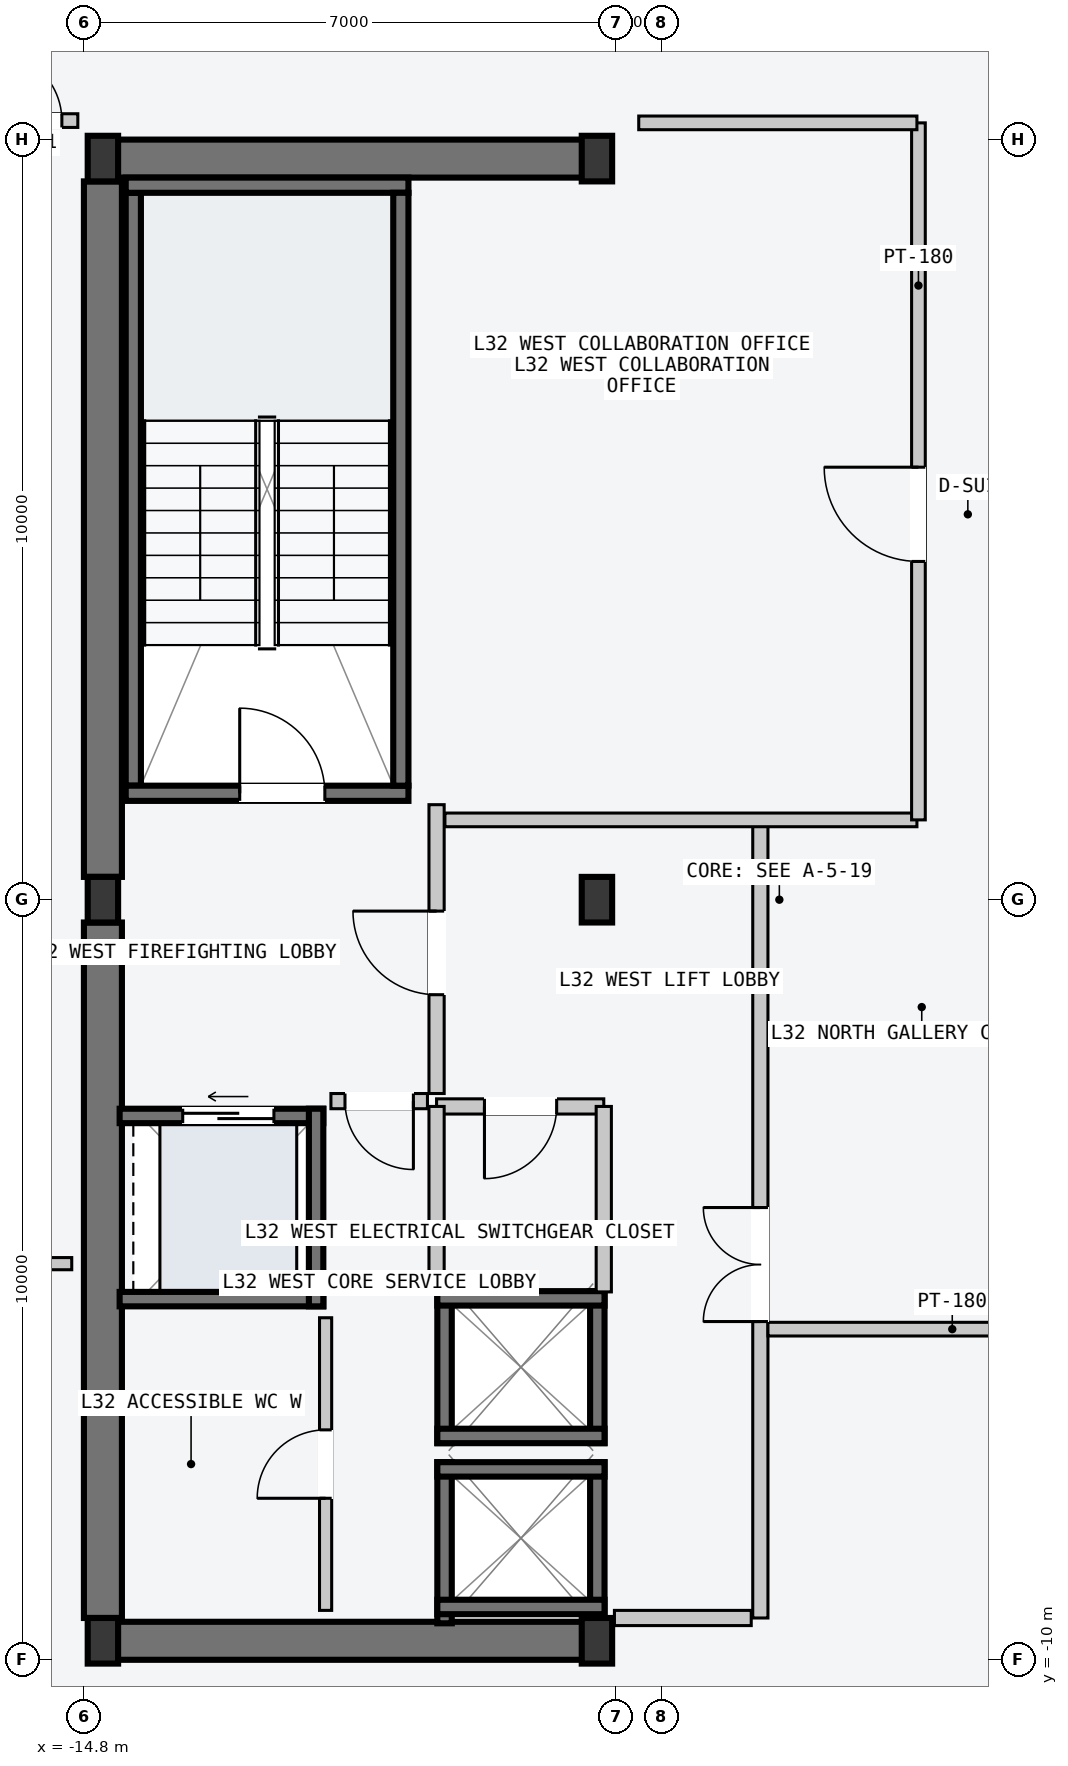
"""IFC4 building model, lengths in metres.
Left out: names, types, materials, properties, quantities, classifications, styles, units other than length and angle.
Written with IfcOpenShell. Run it as: python <this file> out.ifc"""

import sys

from ifc_helpers import new_model, si_unit, direction, frame, frame_2d, origin, origin_2d, place, context, subcontext, project, spatial, rectangle, i_section, extrude, element, fill, save


model = new_model("IFC4")
c1 = context("Model", 3, precision=1e-05, world=origin(), true_north=direction((0.0, 1.0)))
c2 = subcontext(c1, "Body", "Model", "MODEL_VIEW")
j1 = project(units=[si_unit("LENGTHUNIT", "METRE"), si_unit("PLANEANGLEUNIT", "RADIAN")], contexts=[c1])
p1 = place(None, origin())
s1 = spatial("IfcSite", under=j1, at=p1, CompositionType="ELEMENT")
p2 = place(p1, origin())
s2 = spatial("IfcBuilding", under=s1, at=p2, CompositionType="ELEMENT")
p3 = place(p2, frame((0.0, 0.0, 124.2)))
s3 = spatial("IfcBuildingStorey", under=s2, at=p3, CompositionType="ELEMENT", Elevation=124.2)
for number, where, z_axis, x_axis in (
    (1, (-14.53, -9.75, -0.2), (0.0, 0.0, 1.0), (1.0, 0.0, 0.0)),
    (2, (-14.53, 9.75, -0.2), (0.0, 0.0, 1.0), (1.0, 0.0, 0.0)),
):
    element("IfcWall", number, at=place(p3, frame(where, z_axis=z_axis, x_axis=x_axis)), inside=s3, PredefinedType="SHEAR", context=c2, shape_type="SweptSolid", body=[
        extrude(rectangle(XDim=6.46, YDim=0.5, at=frame_2d((3.23, 0.0))), origin(), (0.0, 0.0, 1.0), 3.6),
    ])
for number, where, z_axis, x_axis in (
    (3, (-14.55, -9.45, -0.2), (0.0, 0.0, 1.0), (0.0, 1.0, 0.0)),
    (4, (-14.55, 0.3, -0.2), (0.0, 0.0, 1.0), (0.0, 1.0, 0.0)),
):
    element("IfcWall", number, at=place(p3, frame(where, z_axis=z_axis, x_axis=x_axis)), inside=s3, PredefinedType="SHEAR", context=c2, shape_type="SweptSolid", body=[
        extrude(rectangle(XDim=9.15, YDim=0.5, at=frame_2d((4.575, 0.0))), origin(), (0.0, 0.0, 1.0), 3.6),
    ])
p4 = place(p3, frame((-14.15, 1.5, -0.2), z_axis=(0.0, 0.0, 1.0), x_axis=(0.0, 1.0, 0.0)))
e5 = element("IfcWall", 5, at=p4, inside=s3, PredefinedType="SOLIDWALL", context=c2, shape_type="SweptSolid", body=[
    extrude(rectangle(XDim=7.8, YDim=0.2, at=frame_2d((3.9, 0.0))), origin(), (0.0, 0.0, 1.0), 3.6),
])
p5 = place(p3, frame((-14.25, 1.4, -0.2), z_axis=(0.0, 0.0, 1.0), x_axis=(1.0, 0.0, 0.0)))
e6 = element("IfcWall", 6, at=p5, inside=s3, PredefinedType="SOLIDWALL", context=c2, shape_type="SweptSolid", body=[
    extrude(rectangle(XDim=3.72, YDim=0.2, at=frame_2d((1.86, 0.0))), origin(), (0.0, 0.0, 1.0), 3.6),
])
p6 = place(p5, frame((1.5, 0.0, 0.2)))
e7 = element("IfcOpeningElement", 7, at=p6, cuts=e6, PredefinedType="OPENING", context=c2, shape_type="SweptSolid", body=[
    extrude(rectangle(XDim=1.12, YDim=2.18, at=frame_2d((0.56, 1.09))), frame((0.0, 0.11, 0.0), z_axis=(0.0, -1.0, 0.0), x_axis=(1.0, 0.0, 0.0)), (0.0, 0.0, 1.0), 0.22),
])
p7 = place(p3, frame((-14.25, 9.4, -0.2), z_axis=(0.0, 0.0, 1.0), x_axis=(1.0, 0.0, 0.0)))
e8 = element("IfcWall", 8, at=p7, inside=s3, PredefinedType="SOLIDWALL", context=c2, shape_type="SweptSolid", body=[
    extrude(rectangle(XDim=3.72, YDim=0.2, at=frame_2d((1.86, 0.0))), origin(), (0.0, 0.0, 1.0), 3.6),
])
p8 = place(p3, frame((-10.63, 1.5, -0.2), z_axis=(0.0, 0.0, 1.0), x_axis=(0.0, 1.0, 0.0)))
e9 = element("IfcWall", 9, at=p8, inside=s3, PredefinedType="SOLIDWALL", context=c2, shape_type="SweptSolid", body=[
    extrude(rectangle(XDim=7.8, YDim=0.2, at=frame_2d((3.9, 0.0))), origin(), (0.0, 0.0, 1.0), 3.6),
])
for number, where, z_axis, x_axis in (
    (10, (-14.55, -9.75, 0.0), (0.0, 0.0, 1.0), (1.0, 0.0, 0.0)),
    (11, (-14.55, 0.0, 0.0), (0.0, 0.0, 1.0), (1.0, 0.0, 0.0)),
    (12, (-14.55, 9.75, 0.0), (0.0, 0.0, 1.0), (1.0, 0.0, 0.0)),
    (13, (-8.05, -9.75, 0.0), (0.0, 0.0, 1.0), (1.0, 0.0, 0.0)),
    (14, (-8.05, 0.0, 0.0), (0.0, 0.0, 1.0), (1.0, 0.0, 0.0)),
    (15, (-8.05, 9.75, 0.0), (0.0, 0.0, 1.0), (1.0, 0.0, 0.0)),
):
    element("IfcColumn", number, at=place(p3, frame(where, z_axis=z_axis, x_axis=x_axis)), inside=s3, PredefinedType="COLUMN", context=c2, shape_type="SweptSolid", body=[
        extrude(i_section(OverallWidth=0.4, OverallDepth=0.6, WebThickness=0.022, FlangeThickness=0.036, at=origin_2d()), origin(), (0.0, 0.0, 1.0), 3.6),
    ])
for number, where, z_axis, x_axis in (
    (16, (-8.045, -9.52, -0.2), (0.0, 0.0, 1.0), (0.0, 1.0, 0.0)),
    (17, (-10.055, -9.52, -0.2), (0.0, 0.0, 1.0), (0.0, 1.0, 0.0)),
):
    element("IfcWall", number, at=place(p3, frame(where, z_axis=z_axis, x_axis=x_axis)), inside=s3, PredefinedType="SOLIDWALL", context=c2, shape_type="SweptSolid", body=[
        extrude(rectangle(XDim=2.12, YDim=0.19, at=frame_2d((1.06, 0.0))), origin(), (0.0, 0.0, 1.0), 3.6),
    ])
for number, where, z_axis, x_axis in (
    (18, (-10.15, -7.495, -0.2), (0.0, 0.0, 1.0), (1.0, 0.0, 0.0)),
    (19, (-10.15, -9.305, -0.2), (0.0, 0.0, 1.0), (1.0, 0.0, 0.0)),
):
    element("IfcWall", number, at=place(p3, frame(where, z_axis=z_axis, x_axis=x_axis)), inside=s3, PredefinedType="SOLIDWALL", context=c2, shape_type="SweptSolid", body=[
        extrude(rectangle(XDim=2.2, YDim=0.19, at=frame_2d((1.1, 0.0))), origin(), (0.0, 0.0, 1.0), 3.6),
    ])
for number, where, z_axis, x_axis in (
    (20, (-8.045, -7.15, -0.2), (0.0, 0.0, 1.0), (0.0, 1.0, 0.0)),
    (21, (-10.055, -7.15, -0.2), (0.0, 0.0, 1.0), (0.0, 1.0, 0.0)),
):
    element("IfcWall", number, at=place(p3, frame(where, z_axis=z_axis, x_axis=x_axis)), inside=s3, PredefinedType="SOLIDWALL", context=c2, shape_type="SweptSolid", body=[
        extrude(rectangle(XDim=2.0, YDim=0.19, at=frame_2d((1.0, 0.0))), origin(), (0.0, 0.0, 1.0), 3.6),
    ])
for number, where, z_axis, x_axis in (
    (22, (-10.15, -5.245, -0.2), (0.0, 0.0, 1.0), (1.0, 0.0, 0.0)),
    (23, (-10.15, -7.055, -0.2), (0.0, 0.0, 1.0), (1.0, 0.0, 0.0)),
):
    element("IfcWall", number, at=place(p3, frame(where, z_axis=z_axis, x_axis=x_axis)), inside=s3, PredefinedType="SOLIDWALL", context=c2, shape_type="SweptSolid", body=[
        extrude(rectangle(XDim=2.2, YDim=0.19, at=frame_2d((1.1, 0.0))), origin(), (0.0, 0.0, 1.0), 3.6),
    ])
p9 = place(p3, frame((-14.33, -2.845, -0.2), z_axis=(0.0, 0.0, 1.0), x_axis=(1.0, 0.0, 0.0)))
e24 = element("IfcWall", 24, at=p9, inside=s3, PredefinedType="SOLIDWALL", context=c2, shape_type="SweptSolid", body=[
    extrude(rectangle(XDim=2.68, YDim=0.19, at=frame_2d((1.34, 0.0))), origin(), (0.0, 0.0, 1.0), 3.6),
])
p10 = place(p9, frame((0.83, 0.0, 0.2)))
e25 = element("IfcOpeningElement", 25, at=p10, cuts=e24, PredefinedType="OPENING", context=c2, shape_type="SweptSolid", body=[
    extrude(rectangle(XDim=1.2, YDim=2.2, at=frame_2d((0.6, 1.1))), frame((0.0, 0.105, 0.0), z_axis=(0.0, -1.0, 0.0), x_axis=(1.0, 0.0, 0.0)), (0.0, 0.0, 1.0), 0.21),
])
p11 = place(p3, frame((-14.33, -5.255, -0.2), z_axis=(0.0, 0.0, 1.0), x_axis=(1.0, 0.0, 0.0)))
e26 = element("IfcWall", 26, at=p11, inside=s3, PredefinedType="SOLIDWALL", context=c2, shape_type="SweptSolid", body=[
    extrude(rectangle(XDim=2.68, YDim=0.19, at=frame_2d((1.34, 0.0))), origin(), (0.0, 0.0, 1.0), 3.6),
])
p12 = place(p3, frame((-11.745, -5.35, -0.2), z_axis=(0.0, 0.0, 1.0), x_axis=(0.0, 1.0, 0.0)))
e27 = element("IfcWall", 27, at=p12, inside=s3, PredefinedType="SOLIDWALL", context=c2, shape_type="SweptSolid", body=[
    extrude(rectangle(XDim=2.6, YDim=0.19, at=frame_2d((1.3, 0.0))), origin(), (0.0, 0.0, 1.0), 3.6),
])
p13 = place(p3, frame((-5.9, -9.45, 0.0), z_axis=(0.0, 0.0, 1.0), x_axis=(0.0, 1.0, 0.0)))
e28 = element("IfcWall", 28, at=p13, inside=s3, PredefinedType="PARTITIONING", context=c2, shape_type="SweptSolid", body=[
    extrude(rectangle(XDim=10.5, YDim=0.2, at=frame_2d((5.25, 0.0))), origin(), (0.0, 0.0, 1.0), 3.4),
])
p14 = place(p13, frame((3.9, 0.0, 0.0)))
e29 = element("IfcOpeningElement", 29, at=p14, cuts=e28, PredefinedType="OPENING", context=c2, shape_type="SweptSolid", body=[
    extrude(rectangle(XDim=1.5, YDim=2.2, at=frame_2d((0.75, 1.1))), frame((0.0, 0.11, 0.0), z_axis=(0.0, -1.0, 0.0), x_axis=(1.0, 0.0, 0.0)), (0.0, 0.0, 1.0), 0.22),
])
p15 = place(p3, frame((-6.02, -9.45, 0.0), z_axis=(0.0, 0.0, 1.0), x_axis=(-1.0, 0.0, 0.0)))
e30 = element("IfcWall", 30, at=p15, inside=s3, PredefinedType="PARTITIONING", context=c2, shape_type="SweptSolid", body=[
    extrude(rectangle(XDim=1.8, YDim=0.2, at=frame_2d((0.9, 0.0))), origin(), (0.0, 0.0, 1.0), 3.4),
])
p16 = place(p3, frame((-10.16, -2.55, 0.0), z_axis=(0.0, 0.0, 1.0), x_axis=(0.0, 1.0, 0.0)))
e31 = element("IfcWall", 31, at=p16, inside=s3, PredefinedType="PARTITIONING", context=c2, shape_type="SweptSolid", body=[
    extrude(rectangle(XDim=3.8, YDim=0.2, at=frame_2d((1.9, 0.0))), origin(), (0.0, 0.0, 1.0), 3.4),
])
p17 = place(p16, frame((1.3, 0.0, 0.0)))
e32 = element("IfcOpeningElement", 32, at=p17, cuts=e31, PredefinedType="OPENING", context=c2, shape_type="SweptSolid", body=[
    extrude(rectangle(XDim=1.1, YDim=2.15, at=frame_2d((0.55, 1.075))), frame((0.0, 0.11, 0.0), z_axis=(0.0, -1.0, 0.0), x_axis=(1.0, 0.0, 0.0)), (0.0, 0.0, 1.0), 0.22),
])
p18 = place(p3, frame((-10.28, -2.65, 0.0), z_axis=(0.0, 0.0, 1.0), x_axis=(-1.0, 0.0, 0.0)))
e33 = element("IfcWall", 33, at=p18, inside=s3, PredefinedType="PARTITIONING", context=c2, shape_type="SweptSolid", body=[
    extrude(rectangle(XDim=1.27, YDim=0.2, at=frame_2d((0.635, 0.0))), origin(), (0.0, 0.0, 1.0), 3.4),
])
p19 = place(p18, frame((0.185, 0.0, 0.0)))
e34 = element("IfcOpeningElement", 34, at=p19, cuts=e33, PredefinedType="OPENING", context=c2, shape_type="SweptSolid", body=[
    extrude(rectangle(XDim=0.9, YDim=2.15, at=frame_2d((0.45, 1.075))), frame((0.0, 0.11, 0.0), z_axis=(0.0, -1.0, 0.0), x_axis=(1.0, 0.0, 0.0)), (0.0, 0.0, 1.0), 0.22),
])
p20 = place(p3, frame((-7.96, -2.72, 0.0), z_axis=(0.0, 0.0, 1.0), x_axis=(-1.0, 0.0, 0.0)))
e35 = element("IfcWall", 35, at=p20, inside=s3, PredefinedType="PARTITIONING", context=c2, shape_type="SweptSolid", body=[
    extrude(rectangle(XDim=2.2, YDim=0.2, at=frame_2d((1.1, 0.0))), origin(), (0.0, 0.0, 1.0), 3.4),
])
p21 = place(p20, frame((0.62, 0.0, 0.0)))
e36 = element("IfcOpeningElement", 36, at=p21, cuts=e35, PredefinedType="OPENING", context=c2, shape_type="SweptSolid", body=[
    extrude(rectangle(XDim=0.95, YDim=2.1, at=frame_2d((0.475, 1.05))), frame((0.0, 0.11, 0.0), z_axis=(0.0, -1.0, 0.0), x_axis=(1.0, 0.0, 0.0)), (0.0, 0.0, 1.0), 0.22),
])
for number, where, z_axis, x_axis in (
    (37, (-7.96, -5.16, 0.0), (0.0, 0.0, 1.0), (0.0, 1.0, 0.0)),
    (38, (-10.16, -5.16, 0.0), (0.0, 0.0, 1.0), (0.0, 1.0, 0.0)),
):
    element("IfcWall", number, at=place(p3, frame(where, z_axis=z_axis, x_axis=x_axis)), inside=s3, PredefinedType="PARTITIONING", context=c2, shape_type="SweptSolid", body=[
        extrude(rectangle(XDim=2.44, YDim=0.2, at=frame_2d((1.22, 0.0))), origin(), (0.0, 0.0, 1.0), 3.4),
    ])
p22 = place(p3, frame((-11.62, -9.35, 0.0), z_axis=(0.0, 0.0, 1.0), x_axis=(0.0, 1.0, 0.0)))
e39 = element("IfcWall", 39, at=p22, inside=s3, PredefinedType="PARTITIONING", context=c2, shape_type="SweptSolid", body=[
    extrude(rectangle(XDim=3.85, YDim=0.16, at=frame_2d((1.925, 0.0))), origin(), (0.0, 0.0, 1.0), 3.4),
])
p23 = place(p22, frame((1.475, 0.0, 0.0)))
e40 = element("IfcOpeningElement", 40, at=p23, cuts=e39, PredefinedType="OPENING", context=c2, shape_type="SweptSolid", body=[
    extrude(rectangle(XDim=0.9, YDim=2.15, at=frame_2d((0.45, 1.075))), frame((0.0, 0.09, 0.0), z_axis=(0.0, -1.0, 0.0), x_axis=(1.0, 0.0, 0.0)), (0.0, 0.0, 1.0), 0.18),
])
p24 = place(p3, frame((-10.05, 1.05, 0.0), z_axis=(0.0, 0.0, 1.0), x_axis=(1.0, 0.0, 0.0)))
e41 = element("IfcWall", 41, at=p24, inside=s3, PredefinedType="PARTITIONING", context=c2, shape_type="SweptSolid", body=[
    extrude(rectangle(XDim=6.21, YDim=0.18, at=frame_2d((3.105, 0.0))), origin(), (0.0, 0.0, 1.0), 3.4),
])
p25 = place(p3, frame((-3.82, 1.05, 0.0), z_axis=(0.0, 0.0, 1.0), x_axis=(0.0, 1.0, 0.0)))
e42 = element("IfcWall", 42, at=p25, inside=s3, PredefinedType="PARTITIONING", context=c2, shape_type="SweptSolid", body=[
    extrude(rectangle(XDim=9.17, YDim=0.18, at=frame_2d((4.585, 0.0))), origin(), (0.0, 0.0, 1.0), 3.4),
])
p26 = place(p25, frame((3.4, 0.0, 0.0)))
e43 = element("IfcOpeningElement", 43, at=p26, cuts=e42, PredefinedType="OPENING", context=c2, shape_type="SweptSolid", body=[
    extrude(rectangle(XDim=1.24, YDim=2.24, at=frame_2d((0.62, 1.12))), frame((0.0, 0.1, 0.0), z_axis=(0.0, -1.0, 0.0), x_axis=(1.0, 0.0, 0.0)), (0.0, 0.0, 1.0), 0.2),
])
p27 = place(p3, frame((-7.5, 10.22, 0.0), z_axis=(0.0, 0.0, 1.0), x_axis=(1.0, 0.0, 0.0)))
e44 = element("IfcWall", 44, at=p27, inside=s3, PredefinedType="PARTITIONING", context=c2, shape_type="SweptSolid", body=[
    extrude(rectangle(XDim=3.66, YDim=0.18, at=frame_2d((1.83, 0.0))), origin(), (0.0, 0.0, 1.0), 3.4),
])
p28 = place(p3, frame((-5.8, -5.65, 0.0), z_axis=(0.0, 0.0, 1.0), x_axis=(1.0, 0.0, 0.0)))
e45 = element("IfcWall", 45, at=p28, inside=s3, PredefinedType="PARTITIONING", context=c2, shape_type="SweptSolid", body=[
    extrude(rectangle(XDim=11.6, YDim=0.18, at=frame_2d((5.8, 0.0))), origin(), (0.0, 0.0, 1.0), 3.4),
])
p29 = place(p28, frame((5.1, 0.0, 0.0)))
e46 = element("IfcOpeningElement", 46, at=p29, cuts=e45, PredefinedType="OPENING", context=c2, shape_type="SweptSolid", body=[
    extrude(rectangle(XDim=1.4, YDim=2.2, at=frame_2d((0.7, 1.1))), frame((0.0, 0.1, 0.0), z_axis=(0.0, -1.0, 0.0), x_axis=(1.0, 0.0, 0.0)), (0.0, 0.0, 1.0), 0.2),
])
p30 = place(p3, frame((-16.2, 10.25, 0.0), z_axis=(0.0, 0.0, 1.0), x_axis=(1.0, 0.0, 0.0)))
e47 = element("IfcWall", 47, at=p30, inside=s3, PredefinedType="PARTITIONING", context=c2, shape_type="SweptSolid", body=[
    extrude(rectangle(XDim=1.32, YDim=0.18, at=frame_2d((0.66, 0.0))), origin(), (0.0, 0.0, 1.0), 3.4),
])
p31 = place(p30, frame((0.21, 0.0, 0.0)))
e48 = element("IfcOpeningElement", 48, at=p31, cuts=e47, PredefinedType="OPENING", context=c2, shape_type="SweptSolid", body=[
    extrude(rectangle(XDim=0.9, YDim=2.15, at=frame_2d((0.45, 1.075))), frame((0.0, 0.1, 0.0), z_axis=(0.0, -1.0, 0.0), x_axis=(1.0, 0.0, 0.0)), (0.0, 0.0, 1.0), 0.2),
])
p32 = place(p3, frame((-22.56, -4.788, 0.0), z_axis=(0.0, 0.0, 1.0), x_axis=(1.0, 0.0, 0.0)))
e49 = element("IfcWall", 49, at=p32, inside=s3, PredefinedType="PARTITIONING", context=c2, shape_type="SweptSolid", body=[
    extrude(rectangle(XDim=7.6, YDim=0.16, at=frame_2d((3.8, 0.0))), origin(), (0.0, 0.0, 1.0), 3.4),
])
p33 = place(p32, frame((0.9, 0.0, 0.0)))
e50 = element("IfcOpeningElement", 50, at=p33, cuts=e49, PredefinedType="OPENING", context=c2, shape_type="SweptSolid", body=[
    extrude(rectangle(XDim=0.96, YDim=2.18, at=frame_2d((0.48, 1.09))), frame((0.0, 0.09, 0.0), z_axis=(0.0, -1.0, 0.0), x_axis=(1.0, 0.0, 0.0)), (0.0, 0.0, 1.0), 0.18),
])
p34 = place(p6, origin())
e51 = element("IfcDoor", 51, at=p34, inside=s3, OperationType="SINGLE_SWING_LEFT", PredefinedType="DOOR", context=c2, shape_type="SweptSolid", body=[
    extrude(rectangle(XDim=1.12, YDim=2.18, at=frame_2d((0.56, 1.09))), frame((0.0, 0.025, 0.0), z_axis=(0.0, -1.0, 0.0), x_axis=(1.0, 0.0, 0.0)), (0.0, 0.0, 1.0), 0.05),
])
fill(e7, e51)
p35 = place(p10, origin())
e52 = element("IfcDoor", 52, at=p35, inside=s3, OperationType="SLIDING_TO_LEFT", PredefinedType="DOOR", context=c2, shape_type="SweptSolid", body=[
    extrude(rectangle(XDim=1.2, YDim=2.2, at=frame_2d((0.6, 1.1))), frame((0.0, 0.025, 0.0), z_axis=(0.0, -1.0, 0.0), x_axis=(1.0, 0.0, 0.0)), (0.0, 0.0, 1.0), 0.05),
])
fill(e25, e52)
p36 = place(p14, origin())
e53 = element("IfcDoor", 53, at=p36, inside=s3, OperationType="DOUBLE_DOOR_SINGLE_SWING", PredefinedType="DOOR", context=c2, shape_type="SweptSolid", body=[
    extrude(rectangle(XDim=1.5, YDim=2.2, at=frame_2d((0.75, 1.1))), frame((0.0, 0.025, 0.0), z_axis=(0.0, -1.0, 0.0), x_axis=(1.0, 0.0, 0.0)), (0.0, 0.0, 1.0), 0.05),
])
fill(e29, e53)
p37 = place(p17, origin())
e54 = element("IfcDoor", 54, at=p37, inside=s3, OperationType="SINGLE_SWING_RIGHT", PredefinedType="DOOR", context=c2, shape_type="SweptSolid", body=[
    extrude(rectangle(XDim=1.1, YDim=2.15, at=frame_2d((0.55, 1.075))), frame((0.0, 0.025, 0.0), z_axis=(0.0, -1.0, 0.0), x_axis=(1.0, 0.0, 0.0)), (0.0, 0.0, 1.0), 0.05),
])
fill(e32, e54)
p38 = place(p19, origin())
e55 = element("IfcDoor", 55, at=p38, inside=s3, OperationType="SINGLE_SWING_LEFT", PredefinedType="DOOR", context=c2, shape_type="SweptSolid", body=[
    extrude(rectangle(XDim=0.9, YDim=2.15, at=frame_2d((0.45, 1.075))), frame((0.0, 0.025, 0.0), z_axis=(0.0, -1.0, 0.0), x_axis=(1.0, 0.0, 0.0)), (0.0, 0.0, 1.0), 0.05),
])
fill(e34, e55)
p39 = place(p21, origin())
e56 = element("IfcDoor", 56, at=p39, inside=s3, OperationType="SINGLE_SWING_RIGHT", PredefinedType="DOOR", context=c2, shape_type="SweptSolid", body=[
    extrude(rectangle(XDim=0.95, YDim=2.1, at=frame_2d((0.475, 1.05))), frame((0.0, 0.025, 0.0), z_axis=(0.0, -1.0, 0.0), x_axis=(1.0, 0.0, 0.0)), (0.0, 0.0, 1.0), 0.05),
])
fill(e36, e56)
p40 = place(p23, origin())
e57 = element("IfcDoor", 57, at=p40, inside=s3, OperationType="SINGLE_SWING_LEFT", PredefinedType="DOOR", context=c2, shape_type="SweptSolid", body=[
    extrude(rectangle(XDim=0.9, YDim=2.15, at=frame_2d((0.45, 1.075))), frame((0.0, 0.025, 0.0), z_axis=(0.0, -1.0, 0.0), x_axis=(1.0, 0.0, 0.0)), (0.0, 0.0, 1.0), 0.05),
])
fill(e40, e57)
p41 = place(p26, origin())
e58 = element("IfcDoor", 58, at=p41, inside=s3, OperationType="SINGLE_SWING_RIGHT", PredefinedType="DOOR", context=c2, shape_type="SweptSolid", body=[
    extrude(rectangle(XDim=1.24, YDim=2.24, at=frame_2d((0.62, 1.12))), frame((0.0, 0.025, 0.0), z_axis=(0.0, -1.0, 0.0), x_axis=(1.0, 0.0, 0.0)), (0.0, 0.0, 1.0), 0.05),
])
fill(e43, e58)
p42 = place(p31, origin())
e59 = element("IfcDoor", 59, at=p42, inside=s3, OperationType="SINGLE_SWING_LEFT", PredefinedType="DOOR", context=c2, shape_type="SweptSolid", body=[
    extrude(rectangle(XDim=0.9, YDim=2.15, at=frame_2d((0.45, 1.075))), frame((0.0, 0.025, 0.0), z_axis=(0.0, -1.0, 0.0), x_axis=(1.0, 0.0, 0.0)), (0.0, 0.0, 1.0), 0.05),
])
fill(e48, e59)
save(model, sys.argv[1])
